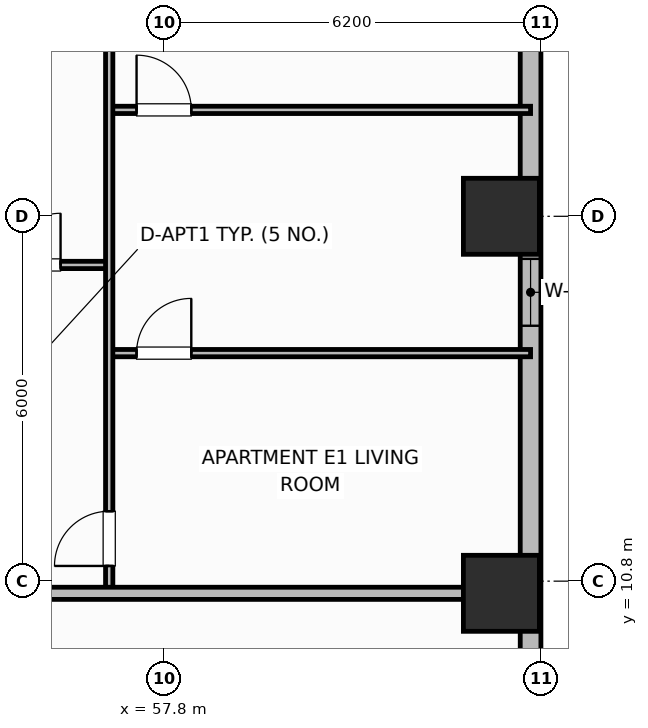
"""IFC4 building model, lengths in metres.
Left out: names, types, materials, properties, quantities, classifications, styles, units other than length and angle.
Written with IfcOpenShell. Run it as: python <this file> out.ifc"""

import sys

from ifc_helpers import new_model, si_unit, direction, frame, frame_2d, origin, origin_2d, place, context, subcontext, project, spatial, rectangle, extrude, element, fill, save


model = new_model("IFC4")
c1 = context("Model", 3, precision=1e-05, world=origin(), true_north=direction((0.0, 1.0)))
c2 = subcontext(c1, "Body", "Model", "MODEL_VIEW")
j1 = project(units=[si_unit("LENGTHUNIT", "METRE"), si_unit("PLANEANGLEUNIT", "RADIAN")], contexts=[c1])
p1 = place(None, origin())
s1 = spatial("IfcSite", under=j1, at=p1, CompositionType="ELEMENT")
p2 = place(p1, origin())
s2 = spatial("IfcBuilding", under=s1, at=p2, CompositionType="ELEMENT")
p3 = place(p2, frame((0.0, 0.0, 39.9)))
s3 = spatial("IfcBuildingStorey", under=s2, at=p3, CompositionType="ELEMENT", Elevation=39.9)
for number, where, z_axis, x_axis in (
    (1, (63.35, 10.6, 0.0), (0.0, 0.0, 1.0), (1.0, 0.0, 0.0)),
    (2, (63.35, 16.8, 0.0), (0.0, 0.0, 1.0), (1.0, 0.0, 0.0)),
):
    element("IfcColumn", number, at=place(p3, frame(where, z_axis=z_axis, x_axis=x_axis)), inside=s3, PredefinedType="COLUMN", context=c2, shape_type="SweptSolid", body=[
        extrude(rectangle(XDim=1.25, YDim=1.25, at=origin_2d()), origin(), (0.0, 0.0, 1.0), 3.7),
    ])
p4 = place(p3, frame((63.83, 9.0, 0.0), z_axis=(0.0, 0.0, 1.0), x_axis=(0.0, 1.0, 0.0)))
e3 = element("IfcWall", 3, at=p4, inside=s3, PredefinedType="SOLIDWALL", context=c2, shape_type="SweptSolid", body=[
    extrude(rectangle(XDim=14.8, YDim=0.34, at=frame_2d((7.4, 0.0))), origin(), (0.0, 0.0, 1.0), 2.7),
])
p5 = place(p4, frame((6.0, 0.0, 0.89)))
e4 = element("IfcOpeningElement", 4, at=p5, cuts=e3, PredefinedType="OPENING", context=c2, shape_type="SweptSolid", body=[
    extrude(rectangle(XDim=1.1, YDim=1.65, at=frame_2d((0.55, 0.825))), frame((0.0, 0.18, 0.0), z_axis=(0.0, -1.0, 0.0), x_axis=(1.0, 0.0, 0.0)), (0.0, 0.0, 1.0), 0.36),
])
p6 = place(p4, frame((11.212, 0.0, 0.73)))
e5 = element("IfcOpeningElement", 5, at=p6, cuts=e3, PredefinedType="OPENING", context=c2, shape_type="SweptSolid", body=[
    extrude(rectangle(XDim=1.8, YDim=1.85, at=frame_2d((0.9, 0.925))), frame((0.0, 0.18, 0.0), z_axis=(0.0, -1.0, 0.0), x_axis=(1.0, 0.0, 0.0)), (0.0, 0.0, 1.0), 0.36),
])
p7 = place(p3, frame((54.65, 16.0, 0.0), z_axis=(0.0, 0.0, 1.0), x_axis=(1.0, 0.0, 0.0)))
e6 = element("IfcWall", 6, at=p7, inside=s3, PredefinedType="PARTITIONING", context=c2, shape_type="SweptSolid", body=[
    extrude(rectangle(XDim=2.25, YDim=0.12, at=frame_2d((1.125, 0.0))), origin(), (0.0, 0.0, 1.0), 2.53),
])
p8 = place(p7, frame((0.6, 0.0, 0.0)))
e7 = element("IfcOpeningElement", 7, at=p8, cuts=e6, PredefinedType="OPENING", context=c2, shape_type="SweptSolid", body=[
    extrude(rectangle(XDim=0.85, YDim=2.1, at=frame_2d((0.425, 1.05))), frame((0.0, 0.07, 0.0), z_axis=(0.0, -1.0, 0.0), x_axis=(1.0, 0.0, 0.0)), (0.0, 0.0, 1.0), 0.14),
])
p9 = place(p3, frame((56.9, 14.55, 0.0), z_axis=(0.0, 0.0, 1.0), x_axis=(1.0, 0.0, 0.0)))
e8 = element("IfcWall", 8, at=p9, inside=s3, PredefinedType="PARTITIONING", context=c2, shape_type="SweptSolid", body=[
    extrude(rectangle(XDim=6.93, YDim=0.12, at=frame_2d((3.465, 0.0))), origin(), (0.0, 0.0, 1.0), 2.53),
])
p10 = place(p9, frame((0.45, 0.0, 0.0)))
e9 = element("IfcOpeningElement", 9, at=p10, cuts=e8, PredefinedType="OPENING", context=c2, shape_type="SweptSolid", body=[
    extrude(rectangle(XDim=0.9, YDim=2.1, at=frame_2d((0.45, 1.05))), frame((0.0, 0.07, 0.0), z_axis=(0.0, -1.0, 0.0), x_axis=(1.0, 0.0, 0.0)), (0.0, 0.0, 1.0), 0.14),
])
p11 = place(p3, frame((56.9, 18.55, 0.0), z_axis=(0.0, 0.0, 1.0), x_axis=(1.0, 0.0, 0.0)))
e10 = element("IfcWall", 10, at=p11, inside=s3, PredefinedType="PARTITIONING", context=c2, shape_type="SweptSolid", body=[
    extrude(rectangle(XDim=6.93, YDim=0.12, at=frame_2d((3.465, 0.0))), origin(), (0.0, 0.0, 1.0), 2.53),
])
p12 = place(p11, frame((0.45, 0.0, 0.0)))
e11 = element("IfcOpeningElement", 11, at=p12, cuts=e10, PredefinedType="OPENING", context=c2, shape_type="SweptSolid", body=[
    extrude(rectangle(XDim=0.9, YDim=2.1, at=frame_2d((0.45, 1.05))), frame((0.0, 0.07, 0.0), z_axis=(0.0, -1.0, 0.0), x_axis=(1.0, 0.0, 0.0)), (0.0, 0.0, 1.0), 0.14),
])
p13 = place(p3, frame((56.9, 10.64, 0.0), z_axis=(0.0, 0.0, 1.0), x_axis=(0.0, 1.0, 0.0)))
e12 = element("IfcWall", 12, at=p13, inside=s3, PredefinedType="PARTITIONING", context=c2, shape_type="SweptSolid", body=[
    extrude(rectangle(XDim=15.92, YDim=0.12, at=frame_2d((7.96, 0.0))), origin(), (0.0, 0.0, 1.0), 2.53),
])
p14 = place(p13, frame((0.41, 0.0, 0.0)))
e13 = element("IfcOpeningElement", 13, at=p14, cuts=e12, PredefinedType="OPENING", context=c2, shape_type="SweptSolid", body=[
    extrude(rectangle(XDim=0.9, YDim=2.1, at=frame_2d((0.45, 1.05))), frame((0.0, 0.07, 0.0), z_axis=(0.0, -1.0, 0.0), x_axis=(1.0, 0.0, 0.0)), (0.0, 0.0, 1.0), 0.14),
])
p15 = place(p13, frame((13.125, 0.0, 0.0)))
e14 = element("IfcOpeningElement", 14, at=p15, cuts=e12, PredefinedType="OPENING", context=c2, shape_type="SweptSolid", body=[
    extrude(rectangle(XDim=0.82, YDim=2.08, at=frame_2d((0.41, 1.04))), frame((0.0, 0.07, 0.0), z_axis=(0.0, -1.0, 0.0), x_axis=(1.0, 0.0, 0.0)), (0.0, 0.0, 1.0), 0.14),
])
p16 = place(p3, frame((54.65, 10.6, 0.0), z_axis=(0.0, 0.0, 1.0), x_axis=(1.0, 0.0, 0.0)))
e15 = element("IfcWall", 15, at=p16, inside=s3, PredefinedType="PARTITIONING", context=c2, shape_type="SweptSolid", body=[
    extrude(rectangle(XDim=8.76, YDim=0.2, at=frame_2d((4.38, 0.0))), origin(), (0.0, 0.0, 1.0), 2.53),
])
p17 = place(p5, origin())
e16 = element("IfcWindow", 16, at=p17, inside=s3, PartitioningType="SINGLE_PANEL", PredefinedType="WINDOW", context=c2, shape_type="SweptSolid", body=[
    extrude(rectangle(XDim=1.1, YDim=1.65, at=frame_2d((0.55, 0.825))), frame((0.0, 0.03, 0.0), z_axis=(0.0, -1.0, 0.0), x_axis=(1.0, 0.0, 0.0)), (0.0, 0.0, 1.0), 0.06),
])
fill(e4, e16)
p18 = place(p8, origin())
e17 = element("IfcDoor", 17, at=p18, inside=s3, OperationType="SINGLE_SWING_RIGHT", PredefinedType="DOOR", context=c2, shape_type="SweptSolid", body=[
    extrude(rectangle(XDim=0.85, YDim=2.1, at=frame_2d((0.425, 1.05))), frame((0.0, 0.025, 0.0), z_axis=(0.0, -1.0, 0.0), x_axis=(1.0, 0.0, 0.0)), (0.0, 0.0, 1.0), 0.05),
])
fill(e7, e17)
p19 = place(p10, origin())
e18 = element("IfcDoor", 18, at=p19, inside=s3, OperationType="SINGLE_SWING_RIGHT", PredefinedType="DOOR", context=c2, shape_type="SweptSolid", body=[
    extrude(rectangle(XDim=0.9, YDim=2.1, at=frame_2d((0.45, 1.05))), frame((0.0, 0.025, 0.0), z_axis=(0.0, -1.0, 0.0), x_axis=(1.0, 0.0, 0.0)), (0.0, 0.0, 1.0), 0.05),
])
fill(e9, e18)
p20 = place(p12, origin())
e19 = element("IfcDoor", 19, at=p20, inside=s3, OperationType="SINGLE_SWING_LEFT", PredefinedType="DOOR", context=c2, shape_type="SweptSolid", body=[
    extrude(rectangle(XDim=0.9, YDim=2.1, at=frame_2d((0.45, 1.05))), frame((0.0, 0.025, 0.0), z_axis=(0.0, -1.0, 0.0), x_axis=(1.0, 0.0, 0.0)), (0.0, 0.0, 1.0), 0.05),
])
fill(e11, e19)
p21 = place(p14, origin())
e20 = element("IfcDoor", 20, at=p21, inside=s3, OperationType="SINGLE_SWING_LEFT", PredefinedType="DOOR", context=c2, shape_type="SweptSolid", body=[
    extrude(rectangle(XDim=0.9, YDim=2.1, at=frame_2d((0.45, 1.05))), frame((0.0, 0.025, 0.0), z_axis=(0.0, -1.0, 0.0), x_axis=(1.0, 0.0, 0.0)), (0.0, 0.0, 1.0), 0.05),
])
fill(e13, e20)
save(model, sys.argv[1])
